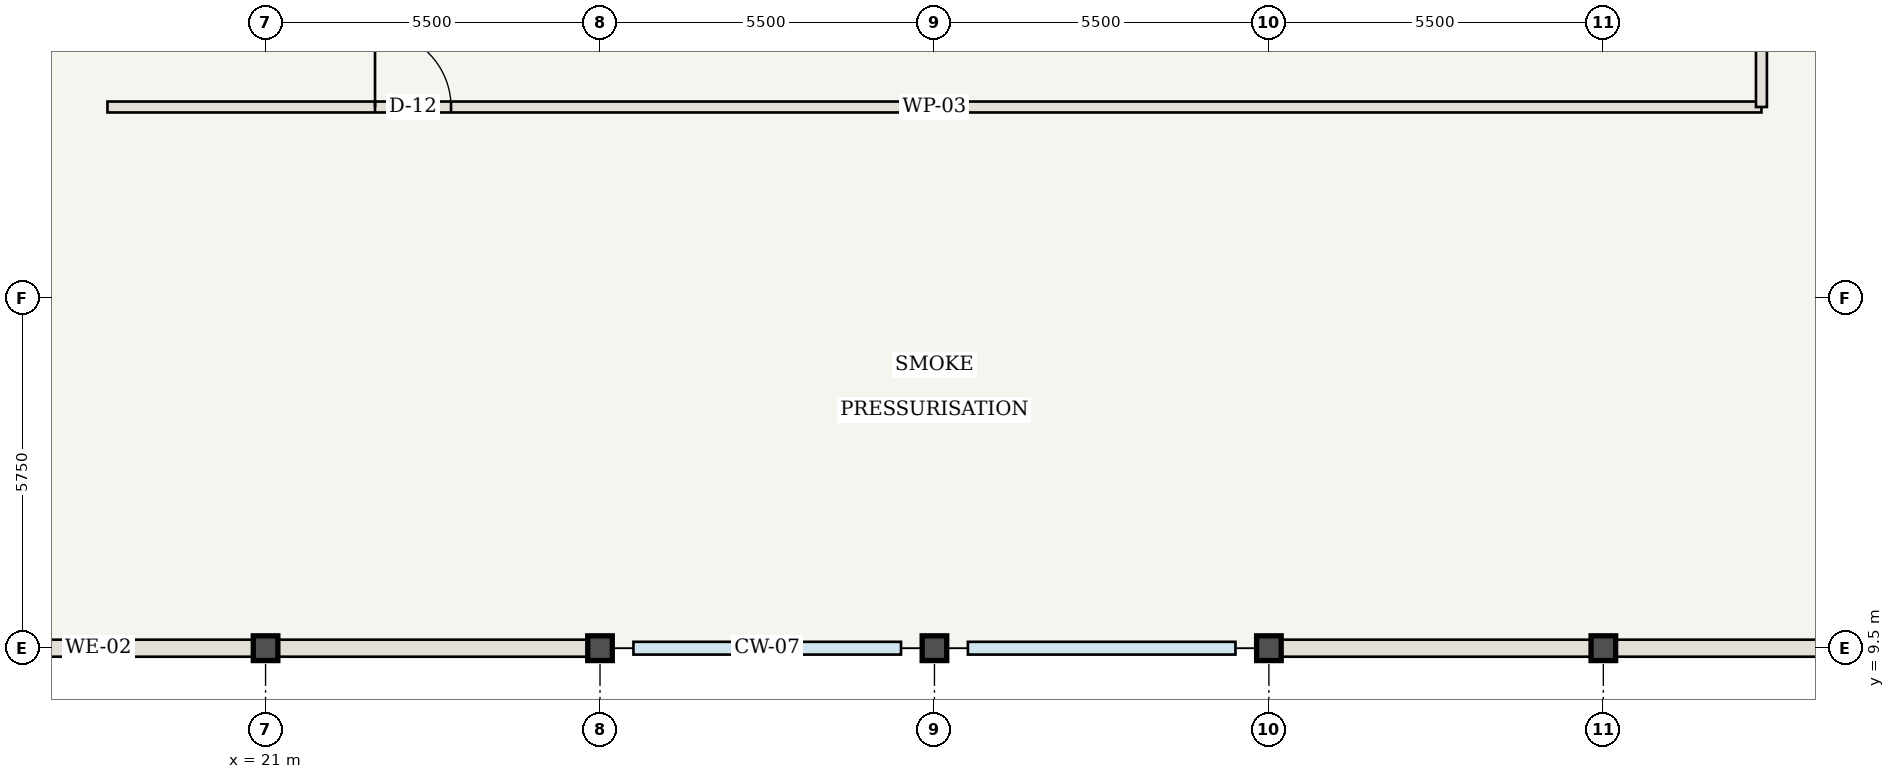
"""IFC4 building model, lengths in metres.
Left out: names, types, materials, properties, quantities, classifications, styles, units other than length and angle.
Written with IfcOpenShell. Run it as: python <this file> out.ifc"""

import sys

from ifc_helpers import new_model, si_unit, direction, frame, frame_2d, origin, origin_2d, place, context, subcontext, project, spatial, rectangle, i_section, extrude, element, fill, save


model = new_model("IFC4")
c1 = context("Model", 3, precision=1e-05, world=origin(), true_north=direction((0.0, 1.0)))
c2 = subcontext(c1, "Body", "Model", "MODEL_VIEW")
j1 = project(units=[si_unit("LENGTHUNIT", "METRE"), si_unit("PLANEANGLEUNIT", "RADIAN")], contexts=[c1])
p1 = place(None, origin())
s1 = spatial("IfcSite", under=j1, at=p1, CompositionType="ELEMENT")
p2 = place(p1, origin())
s2 = spatial("IfcBuilding", under=s1, at=p2, CompositionType="ELEMENT")
p3 = place(p2, frame((0.0, 0.0, 313.25)))
s3 = spatial("IfcBuildingStorey", under=s2, at=p3, CompositionType="ELEMENT", Elevation=313.25)
for number, where, z_axis, x_axis in (
    (1, (21.0, 9.5, 0.0), (0.0, 0.0, 1.0), (1.0, 0.0, 0.0)),
    (2, (26.5, 9.5, 0.0), (0.0, 0.0, 1.0), (1.0, 0.0, 0.0)),
    (3, (32.0, 9.5, 0.0), (0.0, 0.0, 1.0), (1.0, 0.0, 0.0)),
    (4, (37.5, 9.5, 0.0), (0.0, 0.0, 1.0), (1.0, 0.0, 0.0)),
    (5, (43.0, 9.5, 0.0), (0.0, 0.0, 1.0), (1.0, 0.0, 0.0)),
):
    element("IfcColumn", number, at=place(p3, frame(where, z_axis=z_axis, x_axis=x_axis)), inside=s3, PredefinedType="COLUMN", context=c2, shape_type="SweptSolid", body=[
        extrude(i_section(OverallWidth=0.404, OverallDepth=0.407, WebThickness=0.027, FlangeThickness=0.044, at=origin_2d()), origin(), (0.0, 0.0, 1.0), 4.55),
    ])
p4 = place(p3, frame((18.4, 18.4, 0.0), z_axis=(0.0, 0.0, 1.0), x_axis=(1.0, 0.0, 0.0)))
e6 = element("IfcWall", 6, at=p4, inside=s3, PredefinedType="STANDARD", context=c2, shape_type="SweptSolid", body=[
    extrude(rectangle(XDim=27.2, YDim=0.18, at=frame_2d((13.6, 0.0))), origin(), (0.0, 0.0, 1.0), 4.29),
])
p5 = place(p4, frame((4.4, 0.0, 0.0)))
e7 = element("IfcOpeningElement", 7, at=p5, cuts=e6, PredefinedType="OPENING", context=c2, shape_type="SweptSolid", body=[
    extrude(rectangle(XDim=1.25, YDim=2.2, at=frame_2d((0.625, 1.1))), frame((0.0, 0.1, 0.0), z_axis=(0.0, -1.0, 0.0), x_axis=(1.0, 0.0, 0.0)), (0.0, 0.0, 1.0), 0.2),
])
p6 = place(p3, frame((45.6, 18.4, 0.0), z_axis=(0.0, 0.0, 1.0), x_axis=(0.0, 1.0, 0.0)))
e8 = element("IfcWall", 8, at=p6, inside=s3, PredefinedType="STANDARD", context=c2, shape_type="SweptSolid", body=[
    extrude(rectangle(XDim=27.2, YDim=0.18, at=frame_2d((13.6, 0.0))), origin(), (0.0, 0.0, 1.0), 4.29),
])
p7 = place(p6, frame((14.55, 0.0, 0.0)))
e9 = element("IfcOpeningElement", 9, at=p7, cuts=e8, PredefinedType="OPENING", context=c2, shape_type="SweptSolid", body=[
    extrude(rectangle(XDim=1.25, YDim=2.2, at=frame_2d((0.625, 1.1))), frame((0.0, 0.1, 0.0), z_axis=(0.0, -1.0, 0.0), x_axis=(1.0, 0.0, 0.0)), (0.0, 0.0, 1.0), 0.2),
])
for number, where, z_axis, x_axis in (
    (10, (21.0, 9.5, 0.0), (0.0, 0.0, 1.0), (-1.0, 0.0, 0.0)),
    (11, (26.5, 9.5, 0.0), (0.0, 0.0, 1.0), (-1.0, 0.0, 0.0)),
    (12, (43.0, 9.5, 0.0), (0.0, 0.0, 1.0), (-1.0, 0.0, 0.0)),
    (13, (48.5, 9.5, 0.0), (0.0, 0.0, 1.0), (-1.0, 0.0, 0.0)),
):
    element("IfcWall", number, at=place(p3, frame(where, z_axis=z_axis, x_axis=x_axis)), inside=s3, PredefinedType="USERDEFINED", context=c2, shape_type="SweptSolid", body=[
        extrude(rectangle(XDim=5.5, YDim=0.28, at=frame_2d((2.75, 0.0))), origin(), (0.0, 0.0, 1.0), 3.57),
    ])
p8 = place(p5, origin())
e14 = element("IfcDoor", 14, at=p8, inside=s3, OperationType="SINGLE_SWING_LEFT", PredefinedType="DOOR", context=c2, shape_type="SweptSolid", body=[
    extrude(rectangle(XDim=1.25, YDim=2.2, at=frame_2d((0.625, 1.1))), frame((0.0, 0.025, 0.0), z_axis=(0.0, -1.0, 0.0), x_axis=(1.0, 0.0, 0.0)), (0.0, 0.0, 1.0), 0.05),
])
fill(e7, e14)
save(model, sys.argv[1])
